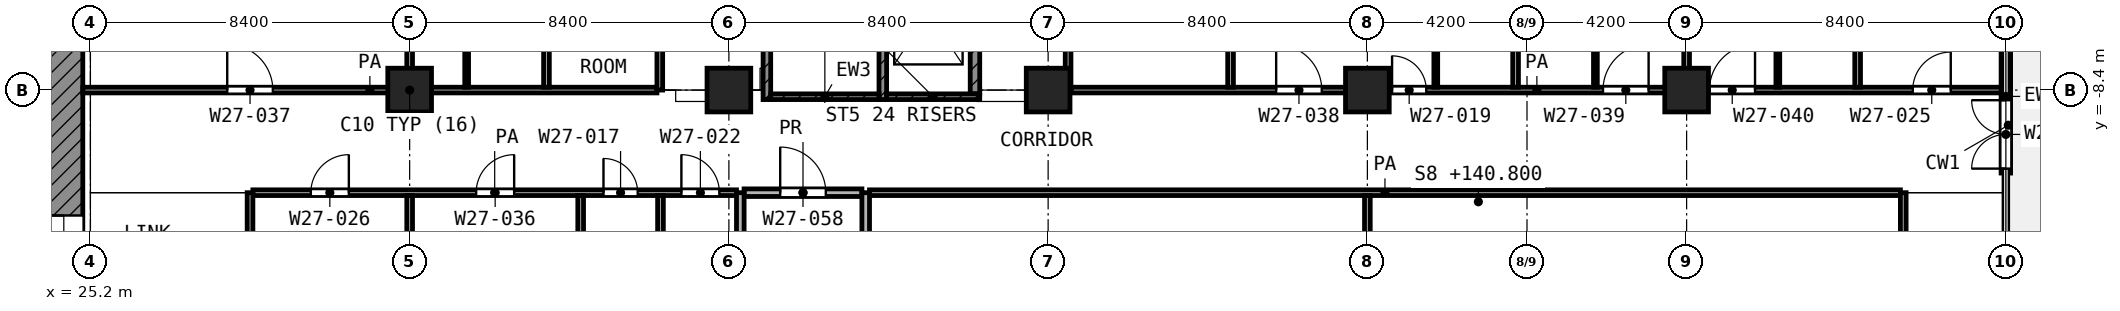
"""IFC4 building model, lengths in metres.
Left out: names, types, materials, properties, quantities, classifications, styles, units other than length and angle.
Written with IfcOpenShell. Run it as: python <this file> out.ifc"""

import sys

from ifc_helpers import new_model, si_unit, direction, frame, frame_2d, origin, origin_2d, place, context, subcontext, project, spatial, rectangle, extrude, element, fill, save


model = new_model("IFC4")
c1 = context("Model", 3, precision=1e-05, world=origin(), true_north=direction((0.0, 1.0)))
c2 = subcontext(c1, "Body", "Model", "MODEL_VIEW")
j1 = project(units=[si_unit("LENGTHUNIT", "METRE"), si_unit("PLANEANGLEUNIT", "RADIAN")], contexts=[c1])
p1 = place(None, origin())
s1 = spatial("IfcSite", under=j1, at=p1, CompositionType="ELEMENT")
p2 = place(p1, origin())
s2 = spatial("IfcBuilding", under=s1, at=p2, CompositionType="ELEMENT")
p3 = place(p2, frame((0.0, 0.0, 140.8)))
s3 = spatial("IfcBuildingStorey", under=s2, at=p3, CompositionType="ELEMENT", Elevation=140.8)
for number, where, z_axis, x_axis in (
    (1, (33.6, -8.4, 0.0), (0.0, 0.0, 1.0), (1.0, 0.0, 0.0)),
    (2, (42.0, -8.4, 0.0), (0.0, 0.0, 1.0), (1.0, 0.0, 0.0)),
    (3, (50.4, -8.4, 0.0), (0.0, 0.0, 1.0), (1.0, 0.0, 0.0)),
    (4, (58.8, -8.4, 0.0), (0.0, 0.0, 1.0), (1.0, 0.0, 0.0)),
    (5, (67.2, -8.4, 0.0), (0.0, 0.0, 1.0), (1.0, 0.0, 0.0)),
):
    element("IfcColumn", number, at=place(p3, frame(where, z_axis=z_axis, x_axis=x_axis)), inside=s3, PredefinedType="COLUMN", context=c2, shape_type="SweptSolid", body=[
        extrude(rectangle(XDim=1.15, YDim=1.15, at=origin_2d()), origin(), (0.0, 0.0, 1.0), 4.2),
    ])
p4 = place(p3, frame((75.6, -10.583, 0.0), z_axis=(0.0, 0.0, 1.0), x_axis=(0.0, 1.0, 0.0)))
e6 = element("IfcWall", 6, at=p4, inside=s3, PredefinedType="SOLIDWALL", context=c2, shape_type="SweptSolid", body=[
    extrude(rectangle(XDim=4.033, YDim=0.25, at=frame_2d((2.017, 0.0))), origin(), (0.0, 0.0, 1.0), 3.48),
])
p5 = place(p4, frame((0.117, 0.0, 0.0)))
e7 = element("IfcOpeningElement", 7, at=p5, cuts=e6, PredefinedType="OPENING", context=c2, shape_type="SweptSolid", body=[
    extrude(rectangle(XDim=1.8, YDim=2.1, at=frame_2d((0.9, 1.05))), frame((0.0, 0.135, 0.0), z_axis=(0.0, -1.0, 0.0), x_axis=(1.0, 0.0, 0.0)), (0.0, 0.0, 1.0), 0.27),
])
p6 = place(p3, frame((24.5, -24.0, 0.0), z_axis=(0.0, 0.0, 1.0), x_axis=(0.0, 1.0, 0.0)))
e8 = element("IfcWall", 8, at=p6, inside=s3, PredefinedType="SHEAR", context=c2, shape_type="SweptSolid", body=[
    extrude(rectangle(XDim=18.6, YDim=1.0, at=frame_2d((9.3, 0.0))), origin(), (0.0, 0.0, 1.0), 3.6),
])
p7 = place(p6, frame((10.5, 0.0, 0.0)))
e9 = element("IfcOpeningElement", 9, at=p7, cuts=e8, PredefinedType="OPENING", context=c2, shape_type="SweptSolid", body=[
    extrude(rectangle(XDim=1.8, YDim=2.1, at=frame_2d((0.9, 1.05))), frame((0.0, 0.51, 0.0), z_axis=(0.0, -1.0, 0.0), x_axis=(1.0, 0.0, 0.0)), (0.0, 0.0, 1.0), 1.02),
])
p8 = place(p3, frame((43.0, -8.65, 0.0), z_axis=(0.0, 0.0, 1.0), x_axis=(0.0, 1.0, 0.0)))
e10 = element("IfcWall", 10, at=p8, inside=s3, PredefinedType="SHEAR", context=c2, shape_type="SweptSolid", body=[
    extrude(rectangle(XDim=8.35, YDim=0.2, at=frame_2d((4.175, 0.0))), origin(), (0.0, 0.0, 1.0), 3.6),
])
p9 = place(p8, frame((7.0, 0.0, 0.0)))
e11 = element("IfcOpeningElement", 11, at=p9, cuts=e10, PredefinedType="OPENING", context=c2, shape_type="SweptSolid", body=[
    extrude(rectangle(XDim=1.1, YDim=2.1, at=frame_2d((0.55, 1.05))), frame((0.0, 0.11, 0.0), z_axis=(0.0, -1.0, 0.0), x_axis=(1.0, 0.0, 0.0)), (0.0, 0.0, 1.0), 0.22),
])
p10 = place(p3, frame((46.05, -8.65, 0.0), z_axis=(0.0, 0.0, 1.0), x_axis=(0.0, 1.0, 0.0)))
e12 = element("IfcWall", 12, at=p10, inside=s3, PredefinedType="SHEAR", context=c2, shape_type="SweptSolid", body=[
    extrude(rectangle(XDim=8.35, YDim=0.2, at=frame_2d((4.175, 0.0))), origin(), (0.0, 0.0, 1.0), 3.6),
])
p11 = place(p10, frame((7.0, 0.0, 0.0)))
e13 = element("IfcOpeningElement", 13, at=p11, cuts=e12, PredefinedType="OPENING", context=c2, shape_type="SweptSolid", body=[
    extrude(rectangle(XDim=1.1, YDim=2.1, at=frame_2d((0.55, 1.05))), frame((0.0, 0.11, 0.0), z_axis=(0.0, -1.0, 0.0), x_axis=(1.0, 0.0, 0.0)), (0.0, 0.0, 1.0), 0.22),
])
p12 = place(p3, frame((43.1, -8.575, 0.0), z_axis=(0.0, 0.0, 1.0), x_axis=(1.0, 0.0, 0.0)))
e14 = element("IfcWall", 14, at=p12, inside=s3, PredefinedType="SHEAR", context=c2, shape_type="SweptSolid", body=[
    extrude(rectangle(XDim=2.85, YDim=0.15, at=frame_2d((1.425, 0.0))), origin(), (0.0, 0.0, 1.0), 3.6),
])
p13 = place(p3, frame((46.15, -8.575, 0.0), z_axis=(0.0, 0.0, 1.0), x_axis=(1.0, 0.0, 0.0)))
e15 = element("IfcWall", 15, at=p13, inside=s3, PredefinedType="SHEAR", context=c2, shape_type="SweptSolid", body=[
    extrude(rectangle(XDim=2.45, YDim=0.15, at=frame_2d((1.225, 0.0))), origin(), (0.0, 0.0, 1.0), 3.6),
])
p14 = place(p3, frame((48.475, -8.5, 0.0), z_axis=(0.0, 0.0, 1.0), x_axis=(0.0, 1.0, 0.0)))
e16 = element("IfcWall", 16, at=p14, inside=s3, PredefinedType="SHEAR", context=c2, shape_type="SweptSolid", body=[
    extrude(rectangle(XDim=3.475, YDim=0.25, at=frame_2d((1.738, 0.0))), origin(), (0.0, 0.0, 1.0), 3.6),
])
p15 = place(p3, frame((35.1, -8.325, 0.0), z_axis=(0.0, 0.0, 1.0), x_axis=(0.0, 1.0, 0.0)))
e17 = element("IfcWall", 17, at=p15, inside=s3, PredefinedType="PARTITIONING", context=c2, shape_type="SweptSolid", body=[
    extrude(rectangle(XDim=2.623, YDim=0.1, at=frame_2d((1.312, 0.0))), origin(), (0.0, 0.0, 1.0), 3.6),
])
p16 = place(p3, frame((60.6, -8.325, 0.0), z_axis=(0.0, 0.0, 1.0), x_axis=(0.0, 1.0, 0.0)))
e18 = element("IfcWall", 18, at=p16, inside=s3, PredefinedType="PARTITIONING", context=c2, shape_type="SweptSolid", body=[
    extrude(rectangle(XDim=2.624, YDim=0.1, at=frame_2d((1.312, 0.0))), origin(), (0.0, 0.0, 1.0), 3.6),
])
for number, where, z_axis, x_axis in (
    (19, (64.8, -8.325, 0.0), (0.0, 0.0, 1.0), (0.0, 1.0, 0.0)),
    (20, (69.6, -8.325, 0.0), (0.0, 0.0, 1.0), (0.0, 1.0, 0.0)),
):
    element("IfcWall", number, at=place(p3, frame(where, z_axis=z_axis, x_axis=x_axis)), inside=s3, PredefinedType="PARTITIONING", context=c2, shape_type="SweptSolid", body=[
        extrude(rectangle(XDim=2.625, YDim=0.1, at=frame_2d((1.312, 0.0))), origin(), (0.0, 0.0, 1.0), 3.6),
    ])
p17 = place(p3, frame((29.475, -11.1, 0.0), z_axis=(0.0, 0.0, 1.0), x_axis=(1.0, 0.0, 0.0)))
e21 = element("IfcWall", 21, at=p17, inside=s3, PredefinedType="PARTITIONING", context=c2, shape_type="SweptSolid", body=[
    extrude(rectangle(XDim=12.725, YDim=0.15, at=frame_2d((6.362, 0.0))), origin(), (0.0, 0.0, 1.0), 3.6),
])
p18 = place(p17, frame((1.525, 0.0, 0.0)))
e22 = element("IfcOpeningElement", 22, at=p18, cuts=e21, PredefinedType="OPENING", context=c2, shape_type="SweptSolid", body=[
    extrude(rectangle(XDim=1.0, YDim=2.1, at=frame_2d((0.5, 1.05))), frame((0.0, 0.085, 0.0), z_axis=(0.0, -1.0, 0.0), x_axis=(1.0, 0.0, 0.0)), (0.0, 0.0, 1.0), 0.17),
])
p19 = place(p17, frame((9.225, 0.0, 0.0)))
e23 = element("IfcOpeningElement", 23, at=p19, cuts=e21, PredefinedType="OPENING", context=c2, shape_type="SweptSolid", body=[
    extrude(rectangle(XDim=0.9, YDim=2.1, at=frame_2d((0.45, 1.05))), frame((0.0, 0.085, 0.0), z_axis=(0.0, -1.0, 0.0), x_axis=(1.0, 0.0, 0.0)), (0.0, 0.0, 1.0), 0.17),
])
p20 = place(p17, frame((11.275, 0.0, 0.0)))
e24 = element("IfcOpeningElement", 24, at=p20, cuts=e21, PredefinedType="OPENING", context=c2, shape_type="SweptSolid", body=[
    extrude(rectangle(XDim=1.0, YDim=2.1, at=frame_2d((0.5, 1.05))), frame((0.0, 0.085, 0.0), z_axis=(0.0, -1.0, 0.0), x_axis=(1.0, 0.0, 0.0)), (0.0, 0.0, 1.0), 0.17),
])
p21 = place(p17, frame((5.875, 0.0, 0.0)))
e25 = element("IfcOpeningElement", 25, at=p21, cuts=e21, PredefinedType="OPENING", context=c2, shape_type="SweptSolid", body=[
    extrude(rectangle(XDim=1.0, YDim=2.1, at=frame_2d((0.5, 1.05))), frame((0.0, 0.085, 0.0), z_axis=(0.0, -1.0, 0.0), x_axis=(1.0, 0.0, 0.0)), (0.0, 0.0, 1.0), 0.17),
])
p22 = place(p3, frame((45.7, -11.1, 0.0), z_axis=(0.0, 0.0, 1.0), x_axis=(1.0, 0.0, 0.0)))
e26 = element("IfcWall", 26, at=p22, inside=s3, PredefinedType="PARTITIONING", context=c2, shape_type="SweptSolid", body=[
    extrude(rectangle(XDim=27.125, YDim=0.15, at=frame_2d((13.562, 0.0))), origin(), (0.0, 0.0, 1.0), 3.6),
])
p23 = place(p3, frame((25.0, -8.4, 0.0), z_axis=(0.0, 0.0, 1.0), x_axis=(1.0, 0.0, 0.0)))
e27 = element("IfcWall", 27, at=p23, inside=s3, PredefinedType="PARTITIONING", context=c2, shape_type="SweptSolid", body=[
    extrude(rectangle(XDim=15.107, YDim=0.15, at=frame_2d((7.553, 0.0))), origin(), (0.0, 0.0, 1.0), 3.6),
])
p24 = place(p23, frame((3.8, 0.0, 0.0)))
e28 = element("IfcOpeningElement", 28, at=p24, cuts=e27, PredefinedType="OPENING", context=c2, shape_type="SweptSolid", body=[
    extrude(rectangle(XDim=1.2, YDim=2.1, at=frame_2d((0.6, 1.05))), frame((0.0, 0.085, 0.0), z_axis=(0.0, -1.0, 0.0), x_axis=(1.0, 0.0, 0.0)), (0.0, 0.0, 1.0), 0.17),
])
p25 = place(p3, frame((51.0, -8.4, 0.0), z_axis=(0.0, 0.0, 1.0), x_axis=(1.0, 0.0, 0.0)))
e29 = element("IfcWall", 29, at=p25, inside=s3, PredefinedType="PARTITIONING", context=c2, shape_type="SweptSolid", body=[
    extrude(rectangle(XDim=24.52, YDim=0.15, at=frame_2d((12.26, 0.0))), origin(), (0.0, 0.0, 1.0), 3.6),
])
p26 = place(p25, frame((5.4, 0.0, 0.0)))
e30 = element("IfcOpeningElement", 30, at=p26, cuts=e29, PredefinedType="OPENING", context=c2, shape_type="SweptSolid", body=[
    extrude(rectangle(XDim=1.2, YDim=2.1, at=frame_2d((0.6, 1.05))), frame((0.0, 0.085, 0.0), z_axis=(0.0, -1.0, 0.0), x_axis=(1.0, 0.0, 0.0)), (0.0, 0.0, 1.0), 0.17),
])
p27 = place(p25, frame((8.45, 0.0, 0.0)))
e31 = element("IfcOpeningElement", 31, at=p27, cuts=e29, PredefinedType="OPENING", context=c2, shape_type="SweptSolid", body=[
    extrude(rectangle(XDim=0.9, YDim=2.1, at=frame_2d((0.45, 1.05))), frame((0.0, 0.085, 0.0), z_axis=(0.0, -1.0, 0.0), x_axis=(1.0, 0.0, 0.0)), (0.0, 0.0, 1.0), 0.17),
])
p28 = place(p25, frame((14.0, 0.0, 0.0)))
e32 = element("IfcOpeningElement", 32, at=p28, cuts=e29, PredefinedType="OPENING", context=c2, shape_type="SweptSolid", body=[
    extrude(rectangle(XDim=1.2, YDim=2.1, at=frame_2d((0.6, 1.05))), frame((0.0, 0.085, 0.0), z_axis=(0.0, -1.0, 0.0), x_axis=(1.0, 0.0, 0.0)), (0.0, 0.0, 1.0), 0.17),
])
p29 = place(p25, frame((16.8, 0.0, 0.0)))
e33 = element("IfcOpeningElement", 33, at=p29, cuts=e29, PredefinedType="OPENING", context=c2, shape_type="SweptSolid", body=[
    extrude(rectangle(XDim=1.2, YDim=2.1, at=frame_2d((0.6, 1.05))), frame((0.0, 0.085, 0.0), z_axis=(0.0, -1.0, 0.0), x_axis=(1.0, 0.0, 0.0)), (0.0, 0.0, 1.0), 0.17),
])
p30 = place(p25, frame((22.15, 0.0, 0.0)))
e34 = element("IfcOpeningElement", 34, at=p30, cuts=e29, PredefinedType="OPENING", context=c2, shape_type="SweptSolid", body=[
    extrude(rectangle(XDim=1.0, YDim=2.1, at=frame_2d((0.5, 1.05))), frame((0.0, 0.085, 0.0), z_axis=(0.0, -1.0, 0.0), x_axis=(1.0, 0.0, 0.0)), (0.0, 0.0, 1.0), 0.17),
])
p31 = place(p3, frame((29.4, -14.1, 0.0), z_axis=(0.0, 0.0, 1.0), x_axis=(0.0, 1.0, 0.0)))
e35 = element("IfcWall", 35, at=p31, inside=s3, PredefinedType="PARTITIONING", context=c2, shape_type="SweptSolid", body=[
    extrude(rectangle(XDim=3.0, YDim=0.15, at=frame_2d((1.5, 0.0))), origin(), (0.0, 0.0, 1.0), 3.6),
])
p32 = place(p3, frame((33.6, -14.025, 0.0), z_axis=(0.0, 0.0, 1.0), x_axis=(0.0, 1.0, 0.0)))
e36 = element("IfcWall", 36, at=p32, inside=s3, PredefinedType="PARTITIONING", context=c2, shape_type="SweptSolid", body=[
    extrude(rectangle(XDim=2.85, YDim=0.15, at=frame_2d((1.425, 0.0))), origin(), (0.0, 0.0, 1.0), 3.6),
])
for number, where, z_axis, x_axis in (
    (37, (33.6, -8.325, 0.0), (0.0, 0.0, 1.0), (0.0, 1.0, 0.0)),
    (38, (37.2, -8.325, 0.0), (0.0, 0.0, 1.0), (0.0, 1.0, 0.0)),
):
    element("IfcWall", number, at=place(p3, frame(where, z_axis=z_axis, x_axis=x_axis)), inside=s3, PredefinedType="PARTITIONING", context=c2, shape_type="SweptSolid", body=[
        extrude(rectangle(XDim=8.322, YDim=0.15, at=frame_2d((4.161, 0.0))), origin(), (0.0, 0.0, 1.0), 3.6),
    ])
p33 = place(p3, frame((38.1, -14.025, 0.0), z_axis=(0.0, 0.0, 1.0), x_axis=(0.0, 1.0, 0.0)))
e39 = element("IfcWall", 39, at=p33, inside=s3, PredefinedType="PARTITIONING", context=c2, shape_type="SweptSolid", body=[
    extrude(rectangle(XDim=2.85, YDim=0.15, at=frame_2d((1.425, 0.0))), origin(), (0.0, 0.0, 1.0), 3.6),
])
p34 = place(p3, frame((40.182, -8.4, 0.0), z_axis=(0.0, 0.0, 1.0), x_axis=(0.0, 1.0, 0.0)))
e40 = element("IfcWall", 40, at=p34, inside=s3, PredefinedType="PARTITIONING", context=c2, shape_type="SweptSolid", body=[
    extrude(rectangle(XDim=8.05, YDim=0.15, at=frame_2d((4.025, 0.0))), origin(), (0.0, 0.0, 1.0), 3.6),
])
p35 = place(p34, frame((3.525, 0.0, 0.0)))
e41 = element("IfcOpeningElement", 41, at=p35, cuts=e40, PredefinedType="OPENING", context=c2, shape_type="SweptSolid", body=[
    extrude(rectangle(XDim=1.0, YDim=2.1, at=frame_2d((0.5, 1.05))), frame((0.0, 0.085, 0.0), z_axis=(0.0, -1.0, 0.0), x_axis=(1.0, 0.0, 0.0)), (0.0, 0.0, 1.0), 0.17),
])
p36 = place(p3, frame((40.2, -14.025, 0.0), z_axis=(0.0, 0.0, 1.0), x_axis=(0.0, 1.0, 0.0)))
e42 = element("IfcWall", 42, at=p36, inside=s3, PredefinedType="PARTITIONING", context=c2, shape_type="SweptSolid", body=[
    extrude(rectangle(XDim=2.85, YDim=0.15, at=frame_2d((1.425, 0.0))), origin(), (0.0, 0.0, 1.0), 3.6),
])
p37 = place(p3, frame((50.925, -8.4, 0.0), z_axis=(0.0, 0.0, 1.0), x_axis=(0.0, 1.0, 0.0)))
e43 = element("IfcWall", 43, at=p37, inside=s3, PredefinedType="PARTITIONING", context=c2, shape_type="SweptSolid", body=[
    extrude(rectangle(XDim=6.548, YDim=0.15, at=frame_2d((3.274, 0.0))), origin(), (0.0, 0.0, 1.0), 3.6),
])
p38 = place(p37, frame((2.774, 0.0, 0.0)))
e44 = element("IfcOpeningElement", 44, at=p38, cuts=e43, PredefinedType="OPENING", context=c2, shape_type="SweptSolid", body=[
    extrude(rectangle(XDim=1.0, YDim=2.1, at=frame_2d((0.5, 1.05))), frame((0.0, 0.085, 0.0), z_axis=(0.0, -1.0, 0.0), x_axis=(1.0, 0.0, 0.0)), (0.0, 0.0, 1.0), 0.17),
])
p39 = place(p3, frame((55.2, -8.325, 0.0), z_axis=(0.0, 0.0, 1.0), x_axis=(0.0, 1.0, 0.0)))
e45 = element("IfcWall", 45, at=p39, inside=s3, PredefinedType="PARTITIONING", context=c2, shape_type="SweptSolid", body=[
    extrude(rectangle(XDim=8.321, YDim=0.15, at=frame_2d((4.161, 0.0))), origin(), (0.0, 0.0, 1.0), 3.6),
])
p40 = place(p3, frame((58.8, -14.025, 0.0), z_axis=(0.0, 0.0, 1.0), x_axis=(0.0, 1.0, 0.0)))
e46 = element("IfcWall", 46, at=p40, inside=s3, PredefinedType="PARTITIONING", context=c2, shape_type="SweptSolid", body=[
    extrude(rectangle(XDim=2.85, YDim=0.15, at=frame_2d((1.425, 0.0))), origin(), (0.0, 0.0, 1.0), 3.6),
])
p41 = place(p3, frame((62.7, -8.325, 0.0), z_axis=(0.0, 0.0, 1.0), x_axis=(0.0, 1.0, 0.0)))
e47 = element("IfcWall", 47, at=p41, inside=s3, PredefinedType="PARTITIONING", context=c2, shape_type="SweptSolid", body=[
    extrude(rectangle(XDim=8.324, YDim=0.15, at=frame_2d((4.162, 0.0))), origin(), (0.0, 0.0, 1.0), 3.6),
])
p42 = place(p3, frame((67.2, -8.325, 0.0), z_axis=(0.0, 0.0, 1.0), x_axis=(0.0, 1.0, 0.0)))
e48 = element("IfcWall", 48, at=p42, inside=s3, PredefinedType="PARTITIONING", context=c2, shape_type="SweptSolid", body=[
    extrude(rectangle(XDim=8.325, YDim=0.15, at=frame_2d((4.163, 0.0))), origin(), (0.0, 0.0, 1.0), 3.6),
])
p43 = place(p3, frame((71.7, -8.325, 0.0), z_axis=(0.0, 0.0, 1.0), x_axis=(0.0, 1.0, 0.0)))
e49 = element("IfcWall", 49, at=p43, inside=s3, PredefinedType="PARTITIONING", context=c2, shape_type="SweptSolid", body=[
    extrude(rectangle(XDim=8.322, YDim=0.15, at=frame_2d((4.161, 0.0))), origin(), (0.0, 0.0, 1.0), 3.6),
])
p44 = place(p3, frame((72.9, -14.1, 0.0), z_axis=(0.0, 0.0, 1.0), x_axis=(0.0, 1.0, 0.0)))
e50 = element("IfcWall", 50, at=p44, inside=s3, PredefinedType="PARTITIONING", context=c2, shape_type="SweptSolid", body=[
    extrude(rectangle(XDim=3.0, YDim=0.15, at=frame_2d((1.5, 0.0))), origin(), (0.0, 0.0, 1.0), 3.6),
])
p45 = place(p3, frame((42.4, -11.1, 0.0), z_axis=(0.0, 0.0, 1.0), x_axis=(1.0, 0.0, 0.0)))
e51 = element("IfcWall", 51, at=p45, inside=s3, PredefinedType="PARTITIONING", context=c2, shape_type="SweptSolid", body=[
    extrude(rectangle(XDim=3.1, YDim=0.2, at=frame_2d((1.55, 0.0))), origin(), (0.0, 0.0, 1.0), 3.6),
])
p46 = place(p45, frame((0.95, 0.0, 0.0)))
e52 = element("IfcOpeningElement", 52, at=p46, cuts=e51, PredefinedType="OPENING", context=c2, shape_type="SweptSolid", body=[
    extrude(rectangle(XDim=1.2, YDim=2.1, at=frame_2d((0.6, 1.05))), frame((0.0, 0.11, 0.0), z_axis=(0.0, -1.0, 0.0), x_axis=(1.0, 0.0, 0.0)), (0.0, 0.0, 1.0), 0.22),
])
for number, where, z_axis, x_axis in (
    (53, (42.3, -14.1, 0.0), (0.0, 0.0, 1.0), (0.0, 1.0, 0.0)),
    (54, (45.6, -14.1, 0.0), (0.0, 0.0, 1.0), (0.0, 1.0, 0.0)),
):
    element("IfcWall", number, at=place(p3, frame(where, z_axis=z_axis, x_axis=x_axis)), inside=s3, PredefinedType="PARTITIONING", context=c2, shape_type="SweptSolid", body=[
        extrude(rectangle(XDim=3.0, YDim=0.2, at=frame_2d((1.5, 0.0))), origin(), (0.0, 0.0, 1.0), 3.6),
    ])
p47 = place(p5, origin())
e55 = element("IfcDoor", 55, at=p47, inside=s3, OperationType="DOUBLE_DOOR_SINGLE_SWING", PredefinedType="DOOR", context=c2, shape_type="SweptSolid", body=[
    extrude(rectangle(XDim=1.8, YDim=2.1, at=frame_2d((0.9, 1.05))), frame((0.0, 0.025, 0.0), z_axis=(0.0, -1.0, 0.0), x_axis=(1.0, 0.0, 0.0)), (0.0, 0.0, 1.0), 0.05),
])
fill(e7, e55)
p48 = place(p7, origin())
e56 = element("IfcDoor", 56, at=p48, inside=s3, OperationType="DOUBLE_DOOR_SINGLE_SWING", PredefinedType="DOOR", context=c2, shape_type="SweptSolid", body=[
    extrude(rectangle(XDim=1.8, YDim=2.1, at=frame_2d((0.9, 1.05))), frame((0.0, 0.025, 0.0), z_axis=(0.0, -1.0, 0.0), x_axis=(1.0, 0.0, 0.0)), (0.0, 0.0, 1.0), 0.05),
])
fill(e9, e56)
p49 = place(p24, origin())
e57 = element("IfcDoor", 57, at=p49, inside=s3, OperationType="SINGLE_SWING_LEFT", PredefinedType="DOOR", context=c2, shape_type="SweptSolid", body=[
    extrude(rectangle(XDim=1.2, YDim=2.1, at=frame_2d((0.6, 1.05))), frame((0.0, 0.025, 0.0), z_axis=(0.0, -1.0, 0.0), x_axis=(1.0, 0.0, 0.0)), (0.0, 0.0, 1.0), 0.05),
])
fill(e28, e57)
p50 = place(p26, origin())
e58 = element("IfcDoor", 58, at=p50, inside=s3, OperationType="SINGLE_SWING_LEFT", PredefinedType="DOOR", context=c2, shape_type="SweptSolid", body=[
    extrude(rectangle(XDim=1.2, YDim=2.1, at=frame_2d((0.6, 1.05))), frame((0.0, 0.025, 0.0), z_axis=(0.0, -1.0, 0.0), x_axis=(1.0, 0.0, 0.0)), (0.0, 0.0, 1.0), 0.05),
])
fill(e30, e58)
p51 = place(p27, origin())
e59 = element("IfcDoor", 59, at=p51, inside=s3, OperationType="SINGLE_SWING_LEFT", PredefinedType="DOOR", context=c2, shape_type="SweptSolid", body=[
    extrude(rectangle(XDim=0.9, YDim=2.1, at=frame_2d((0.45, 1.05))), frame((0.0, 0.025, 0.0), z_axis=(0.0, -1.0, 0.0), x_axis=(1.0, 0.0, 0.0)), (0.0, 0.0, 1.0), 0.05),
])
fill(e31, e59)
p52 = place(p28, origin())
e60 = element("IfcDoor", 60, at=p52, inside=s3, OperationType="SINGLE_SWING_RIGHT", PredefinedType="DOOR", context=c2, shape_type="SweptSolid", body=[
    extrude(rectangle(XDim=1.2, YDim=2.1, at=frame_2d((0.6, 1.05))), frame((0.0, 0.025, 0.0), z_axis=(0.0, -1.0, 0.0), x_axis=(1.0, 0.0, 0.0)), (0.0, 0.0, 1.0), 0.05),
])
fill(e32, e60)
p53 = place(p29, origin())
e61 = element("IfcDoor", 61, at=p53, inside=s3, OperationType="SINGLE_SWING_RIGHT", PredefinedType="DOOR", context=c2, shape_type="SweptSolid", body=[
    extrude(rectangle(XDim=1.2, YDim=2.1, at=frame_2d((0.6, 1.05))), frame((0.0, 0.025, 0.0), z_axis=(0.0, -1.0, 0.0), x_axis=(1.0, 0.0, 0.0)), (0.0, 0.0, 1.0), 0.05),
])
fill(e33, e61)
p54 = place(p30, origin())
e62 = element("IfcDoor", 62, at=p54, inside=s3, OperationType="SINGLE_SWING_RIGHT", PredefinedType="DOOR", context=c2, shape_type="SweptSolid", body=[
    extrude(rectangle(XDim=1.0, YDim=2.1, at=frame_2d((0.5, 1.05))), frame((0.0, 0.025, 0.0), z_axis=(0.0, -1.0, 0.0), x_axis=(1.0, 0.0, 0.0)), (0.0, 0.0, 1.0), 0.05),
])
fill(e34, e62)
p55 = place(p18, origin())
e63 = element("IfcDoor", 63, at=p55, inside=s3, OperationType="SINGLE_SWING_RIGHT", PredefinedType="DOOR", context=c2, shape_type="SweptSolid", body=[
    extrude(rectangle(XDim=1.0, YDim=2.1, at=frame_2d((0.5, 1.05))), frame((0.0, 0.025, 0.0), z_axis=(0.0, -1.0, 0.0), x_axis=(1.0, 0.0, 0.0)), (0.0, 0.0, 1.0), 0.05),
])
fill(e22, e63)
p56 = place(p19, origin())
e64 = element("IfcDoor", 64, at=p56, inside=s3, OperationType="SINGLE_SWING_LEFT", PredefinedType="DOOR", context=c2, shape_type="SweptSolid", body=[
    extrude(rectangle(XDim=0.9, YDim=2.1, at=frame_2d((0.45, 1.05))), frame((0.0, 0.025, 0.0), z_axis=(0.0, -1.0, 0.0), x_axis=(1.0, 0.0, 0.0)), (0.0, 0.0, 1.0), 0.05),
])
fill(e23, e64)
p57 = place(p20, origin())
e65 = element("IfcDoor", 65, at=p57, inside=s3, OperationType="SINGLE_SWING_LEFT", PredefinedType="DOOR", context=c2, shape_type="SweptSolid", body=[
    extrude(rectangle(XDim=1.0, YDim=2.1, at=frame_2d((0.5, 1.05))), frame((0.0, 0.025, 0.0), z_axis=(0.0, -1.0, 0.0), x_axis=(1.0, 0.0, 0.0)), (0.0, 0.0, 1.0), 0.05),
])
fill(e24, e65)
p58 = place(p46, origin())
e66 = element("IfcDoor", 66, at=p58, inside=s3, OperationType="SINGLE_SWING_LEFT", PredefinedType="DOOR", context=c2, shape_type="SweptSolid", body=[
    extrude(rectangle(XDim=1.2, YDim=2.1, at=frame_2d((0.6, 1.05))), frame((0.0, 0.025, 0.0), z_axis=(0.0, -1.0, 0.0), x_axis=(1.0, 0.0, 0.0)), (0.0, 0.0, 1.0), 0.05),
])
fill(e52, e66)
p59 = place(p21, origin())
e67 = element("IfcDoor", 67, at=p59, inside=s3, OperationType="SINGLE_SWING_RIGHT", PredefinedType="DOOR", context=c2, shape_type="SweptSolid", body=[
    extrude(rectangle(XDim=1.0, YDim=2.1, at=frame_2d((0.5, 1.05))), frame((0.0, 0.025, 0.0), z_axis=(0.0, -1.0, 0.0), x_axis=(1.0, 0.0, 0.0)), (0.0, 0.0, 1.0), 0.05),
])
fill(e25, e67)
save(model, sys.argv[1])
